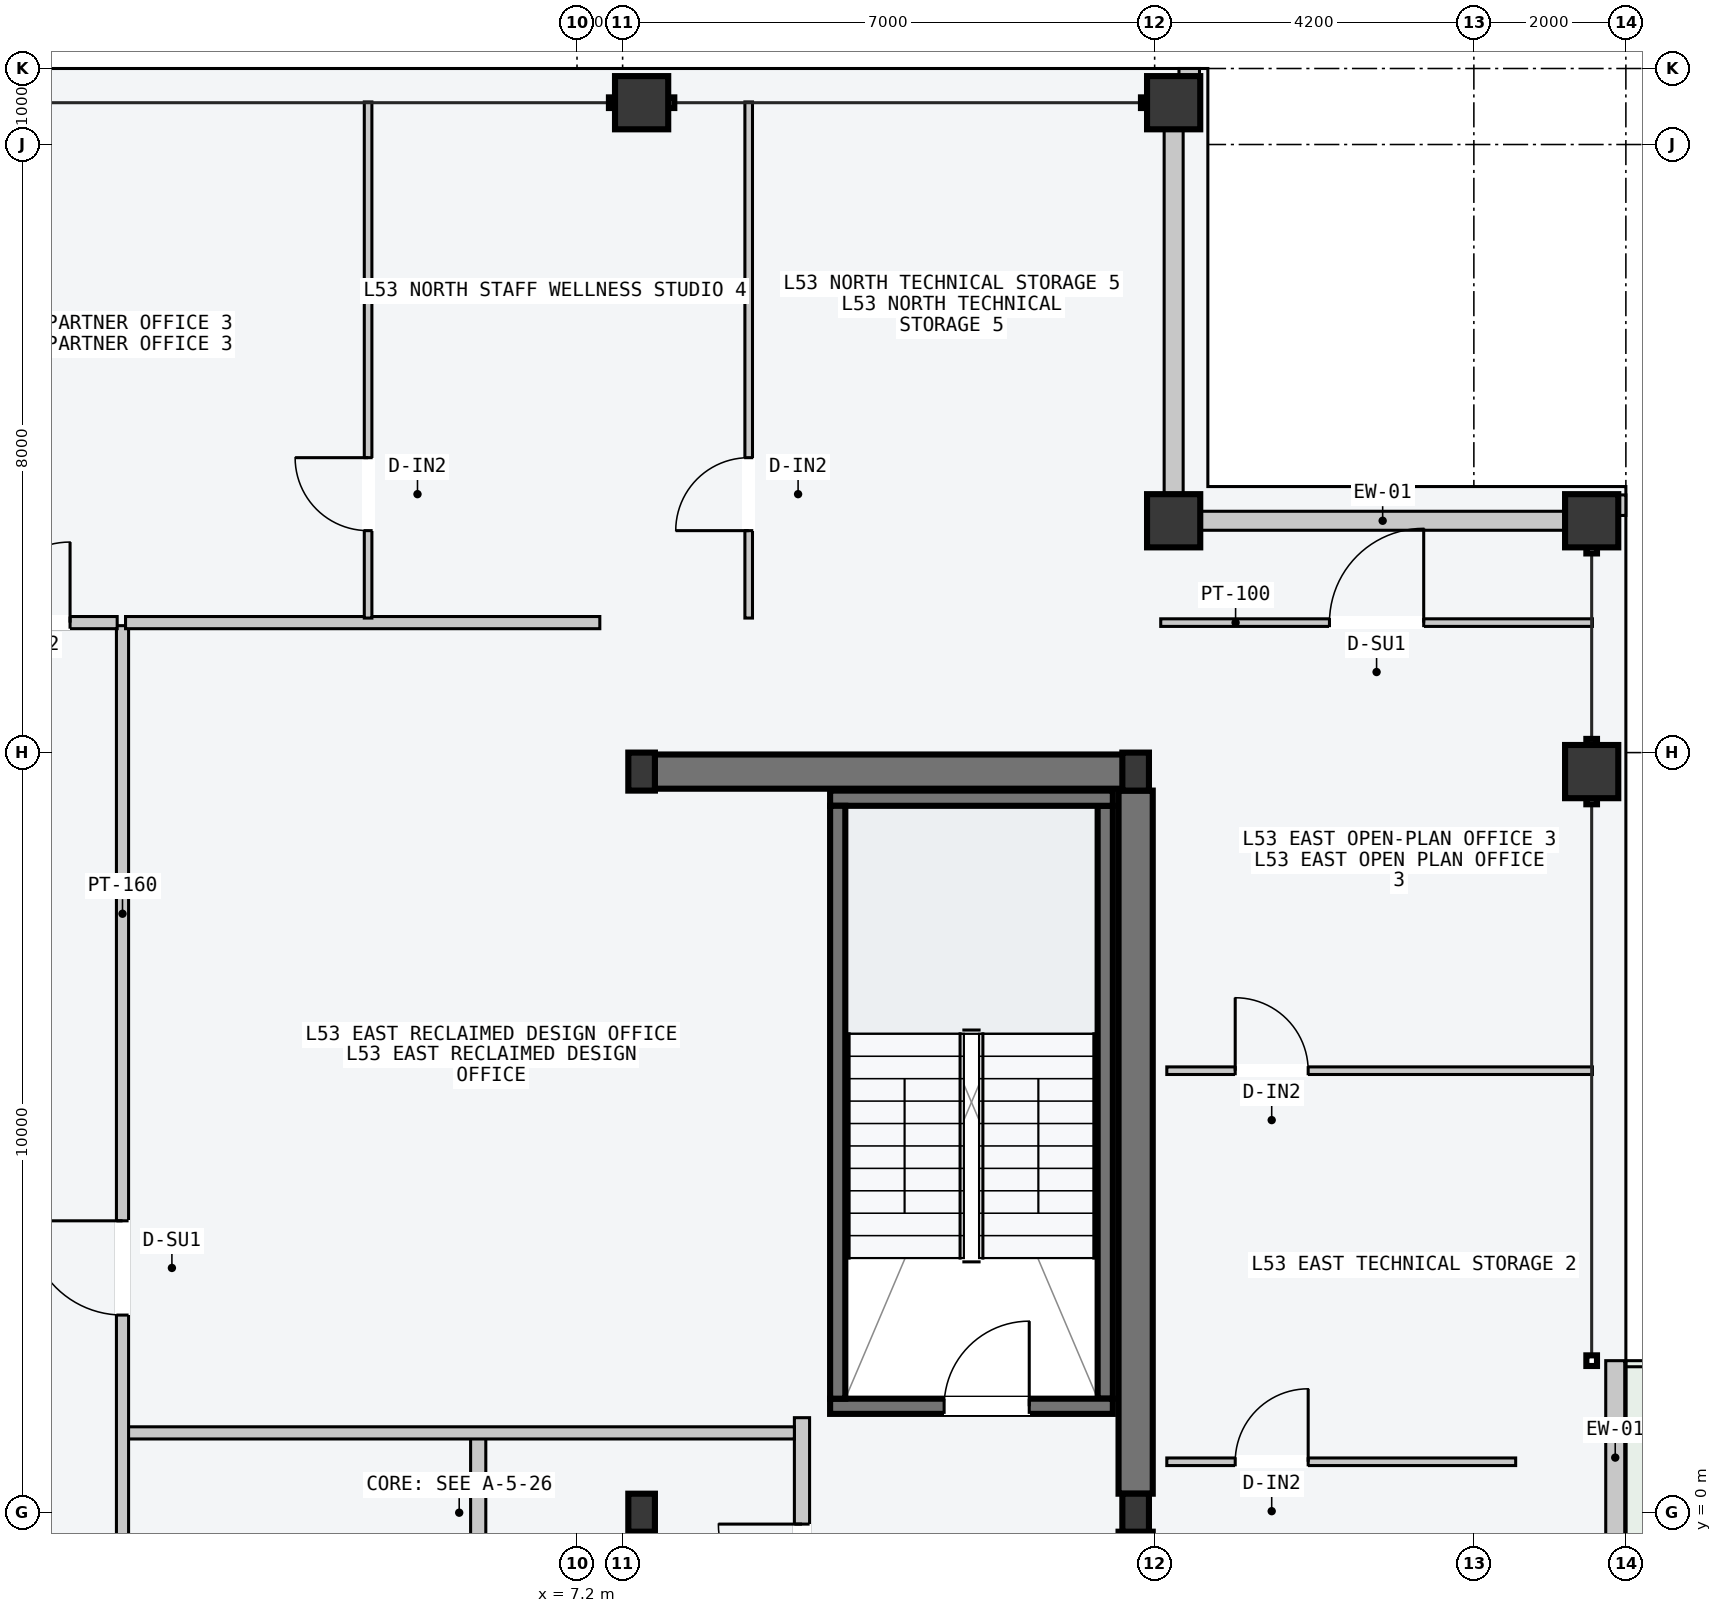
"""IFC4 building model, lengths in metres.
Left out: names, types, materials, properties, quantities, classifications, styles, units other than length and angle.
Written with IfcOpenShell. Run it as: python <this file> out.ifc"""

import sys

from ifc_helpers import new_model, si_unit, direction, frame, frame_2d, origin, origin_2d, place, context, subcontext, project, spatial, rectangle, hollow_rectangle, i_section, extrude, element, fill, save


model = new_model("IFC4")
c1 = context("Model", 3, precision=1e-05, world=origin(), true_north=direction((0.0, 1.0)))
c2 = subcontext(c1, "Body", "Model", "MODEL_VIEW")
j1 = project(units=[si_unit("LENGTHUNIT", "METRE"), si_unit("PLANEANGLEUNIT", "RADIAN")], contexts=[c1])
p1 = place(None, origin())
s1 = spatial("IfcSite", under=j1, at=p1, CompositionType="ELEMENT")
p2 = place(p1, origin())
s2 = spatial("IfcBuilding", under=s1, at=p2, CompositionType="ELEMENT")
p3 = place(p2, frame((0.0, 0.0, 201.9)))
s3 = spatial("IfcBuildingStorey", under=s2, at=p3, CompositionType="ELEMENT", Elevation=201.9)
p4 = place(p3, frame((8.07, 9.75, -0.2), z_axis=(0.0, 0.0, 1.0), x_axis=(1.0, 0.0, 0.0)))
e1 = element("IfcWall", 1, at=p4, inside=s3, PredefinedType="SHEAR", context=c2, shape_type="SweptSolid", body=[
    extrude(rectangle(XDim=6.46, YDim=0.45, at=frame_2d((3.23, 0.0))), origin(), (0.0, 0.0, 1.0), 3.6),
])
for number, where, z_axis, x_axis in (
    (2, (14.55, -9.5, -0.2), (0.0, 0.0, 1.0), (0.0, 1.0, 0.0)),
    (3, (14.55, 0.25, -0.2), (0.0, 0.0, 1.0), (0.0, 1.0, 0.0)),
):
    element("IfcWall", number, at=place(p3, frame(where, z_axis=z_axis, x_axis=x_axis)), inside=s3, PredefinedType="SHEAR", context=c2, shape_type="SweptSolid", body=[
        extrude(rectangle(XDim=9.25, YDim=0.45, at=frame_2d((4.625, 0.0))), origin(), (0.0, 0.0, 1.0), 3.6),
    ])
p5 = place(p3, frame((14.15, 1.5, -0.2), z_axis=(0.0, 0.0, 1.0), x_axis=(0.0, 1.0, 0.0)))
e4 = element("IfcWall", 4, at=p5, inside=s3, PredefinedType="SOLIDWALL", context=c2, shape_type="SweptSolid", body=[
    extrude(rectangle(XDim=7.8, YDim=0.2, at=frame_2d((3.9, 0.0))), origin(), (0.0, 0.0, 1.0), 3.6),
])
p6 = place(p3, frame((10.53, 1.4, -0.2), z_axis=(0.0, 0.0, 1.0), x_axis=(1.0, 0.0, 0.0)))
e5 = element("IfcWall", 5, at=p6, inside=s3, PredefinedType="SOLIDWALL", context=c2, shape_type="SweptSolid", body=[
    extrude(rectangle(XDim=3.72, YDim=0.2, at=frame_2d((1.86, 0.0))), origin(), (0.0, 0.0, 1.0), 3.6),
])
p7 = place(p6, frame((1.5, 0.0, 0.2)))
e6 = element("IfcOpeningElement", 6, at=p7, cuts=e5, PredefinedType="OPENING", context=c2, shape_type="SweptSolid", body=[
    extrude(rectangle(XDim=1.12, YDim=2.18, at=frame_2d((0.56, 1.09))), frame((0.0, 0.11, 0.0), z_axis=(0.0, -1.0, 0.0), x_axis=(1.0, 0.0, 0.0)), (0.0, 0.0, 1.0), 0.22),
])
p8 = place(p3, frame((10.53, 9.4, -0.2), z_axis=(0.0, 0.0, 1.0), x_axis=(1.0, 0.0, 0.0)))
e7 = element("IfcWall", 7, at=p8, inside=s3, PredefinedType="SOLIDWALL", context=c2, shape_type="SweptSolid", body=[
    extrude(rectangle(XDim=3.72, YDim=0.2, at=frame_2d((1.86, 0.0))), origin(), (0.0, 0.0, 1.0), 3.6),
])
p9 = place(p3, frame((10.63, 1.5, -0.2), z_axis=(0.0, 0.0, 1.0), x_axis=(0.0, 1.0, 0.0)))
e8 = element("IfcWall", 8, at=p9, inside=s3, PredefinedType="SOLIDWALL", context=c2, shape_type="SweptSolid", body=[
    extrude(rectangle(XDim=7.8, YDim=0.2, at=frame_2d((3.9, 0.0))), origin(), (0.0, 0.0, 1.0), 3.6),
])
for number, where, z_axis, x_axis in (
    (9, (8.05, 0.0, 0.0), (0.0, 0.0, 1.0), (1.0, 0.0, 0.0)),
    (10, (8.05, 9.75, 0.0), (0.0, 0.0, 1.0), (1.0, 0.0, 0.0)),
    (11, (14.55, 0.0, 0.0), (0.0, 0.0, 1.0), (1.0, 0.0, 0.0)),
    (12, (14.55, 9.75, 0.0), (0.0, 0.0, 1.0), (1.0, 0.0, 0.0)),
):
    element("IfcColumn", number, at=place(p3, frame(where, z_axis=z_axis, x_axis=x_axis)), inside=s3, PredefinedType="COLUMN", context=c2, shape_type="SweptSolid", body=[
        extrude(i_section(OverallWidth=0.35, OverallDepth=0.5, WebThickness=0.02, FlangeThickness=0.032, at=origin_2d()), origin(), (0.0, 0.0, 1.0), 3.6),
    ])
for number, where, z_axis, x_axis in (
    (13, (8.05, 18.55, 0.0), (0.0, 0.0, 1.0), (1.0, 0.0, 0.0)),
    (14, (15.05, 18.55, 0.0), (0.0, 0.0, 1.0), (1.0, 0.0, 0.0)),
    (15, (20.55, 9.75, 0.0), (0.0, 0.0, 1.0), (0.0, 1.0, 0.0)),
    (16, (20.55, 13.05, 0.0), (0.0, 0.0, 1.0), (0.0, 1.0, 0.0)),
    (17, (15.05, 13.05, 0.0), (0.0, 0.0, 1.0), (1.0, 0.0, 0.0)),
):
    element("IfcColumn", number, at=place(p3, frame(where, z_axis=z_axis, x_axis=x_axis)), inside=s3, PredefinedType="COLUMN", context=c2, shape_type="SweptSolid", body=[
        extrude(hollow_rectangle(XDim=0.7, YDim=0.7, WallThickness=0.03, at=origin_2d()), origin(), (0.0, 0.0, 1.0), 3.6),
    ])
p10 = place(p3, frame((20.86, -8.8, 0.0), z_axis=(0.0, 0.0, 1.0), x_axis=(0.0, 1.0, 0.0)))
e18 = element("IfcWall", 18, at=p10, inside=s3, PredefinedType="STANDARD", context=c2, shape_type="SweptSolid", body=[
    extrude(rectangle(XDim=10.8, YDim=0.25, at=frame_2d((5.4, 0.0))), origin(), (0.0, 0.0, 1.0), 3.4),
])
p11 = place(p10, frame((6.4, 0.0, 0.0)))
e19 = element("IfcOpeningElement", 19, at=p11, cuts=e18, PredefinedType="OPENING", context=c2, shape_type="SweptSolid", body=[
    extrude(rectangle(XDim=1.6, YDim=2.2, at=frame_2d((0.8, 1.1))), frame((0.0, 0.135, 0.0), z_axis=(0.0, -1.0, 0.0), x_axis=(1.0, 0.0, 0.0)), (0.0, 0.0, 1.0), 0.27),
])
p12 = place(p10, frame((2.0, 0.0, 0.85)))
e20 = element("IfcOpeningElement", 20, at=p12, cuts=e18, PredefinedType="OPENING", context=c2, shape_type="SweptSolid", body=[
    extrude(rectangle(XDim=2.0, YDim=2.1, at=frame_2d((1.0, 1.05))), frame((0.0, 0.135, 0.0), z_axis=(0.0, -1.0, 0.0), x_axis=(1.0, 0.0, 0.0)), (0.0, 0.0, 1.0), 0.27),
])
for number, where, z_axis, x_axis in (
    (21, (15.41, 13.05, 0.0), (0.0, 0.0, 1.0), (1.0, 0.0, 0.0)),
    (22, (15.05, 13.41, 0.0), (0.0, 0.0, 1.0), (0.0, 1.0, 0.0)),
):
    element("IfcWall", number, at=place(p3, frame(where, z_axis=z_axis, x_axis=x_axis)), inside=s3, PredefinedType="STANDARD", context=c2, shape_type="SweptSolid", body=[
        extrude(rectangle(XDim=4.78, YDim=0.25, at=frame_2d((2.39, 0.0))), origin(), (0.0, 0.0, 1.0), 2.75),
    ])
for number, where, z_axis, x_axis in (
    (23, (15.12, 18.89, 0.0), (0.0, 0.0, 1.0), (1.0, 0.0, 0.0)),
    (24, (20.89, 13.12, 0.0), (0.0, 0.0, 1.0), (0.0, 1.0, 0.0)),
):
    element("IfcWall", number, at=place(p3, frame(where, z_axis=z_axis, x_axis=x_axis)), inside=s3, PredefinedType="PARAPET", context=c2, shape_type="SweptSolid", body=[
        extrude(rectangle(XDim=0.27, YDim=0.22, at=frame_2d((0.135, 0.0))), origin(), (0.0, 0.0, 1.0), 1.2),
    ])
p13 = place(p3, frame((5.9, -9.45, 0.0), z_axis=(0.0, 0.0, 1.0), x_axis=(0.0, 1.0, 0.0)))
e25 = element("IfcWall", 25, at=p13, inside=s3, PredefinedType="PARTITIONING", context=c2, shape_type="SweptSolid", body=[
    extrude(rectangle(XDim=10.5, YDim=0.2, at=frame_2d((5.25, 0.0))), origin(), (0.0, 0.0, 1.0), 3.4),
])
p14 = place(p13, frame((3.9, 0.0, 0.0)))
e26 = element("IfcOpeningElement", 26, at=p14, cuts=e25, PredefinedType="OPENING", context=c2, shape_type="SweptSolid", body=[
    extrude(rectangle(XDim=1.5, YDim=2.2, at=frame_2d((0.75, 1.1))), frame((0.0, 0.11, 0.0), z_axis=(0.0, -1.0, 0.0), x_axis=(1.0, 0.0, 0.0)), (0.0, 0.0, 1.0), 0.22),
])
p15 = place(p3, frame((10.16, -2.55, 0.0), z_axis=(0.0, 0.0, 1.0), x_axis=(0.0, 1.0, 0.0)))
e27 = element("IfcWall", 27, at=p15, inside=s3, PredefinedType="PARTITIONING", context=c2, shape_type="SweptSolid", body=[
    extrude(rectangle(XDim=3.8, YDim=0.2, at=frame_2d((1.9, 0.0))), origin(), (0.0, 0.0, 1.0), 3.4),
])
p16 = place(p15, frame((1.3, 0.0, 0.0)))
e28 = element("IfcOpeningElement", 28, at=p16, cuts=e27, PredefinedType="OPENING", context=c2, shape_type="SweptSolid", body=[
    extrude(rectangle(XDim=1.1, YDim=2.15, at=frame_2d((0.55, 1.075))), frame((0.0, 0.11, 0.0), z_axis=(0.0, -1.0, 0.0), x_axis=(1.0, 0.0, 0.0)), (0.0, 0.0, 1.0), 0.22),
])
p17 = place(p3, frame((1.26, 1.05, 0.0), z_axis=(0.0, 0.0, 1.0), x_axis=(1.0, 0.0, 0.0)))
e29 = element("IfcWall", 29, at=p17, inside=s3, PredefinedType="PARTITIONING", context=c2, shape_type="SweptSolid", body=[
    extrude(rectangle(XDim=8.8, YDim=0.16, at=frame_2d((4.4, 0.0))), origin(), (0.0, 0.0, 1.0), 3.4),
])
p18 = place(p3, frame((1.22, -3.5, 0.0), z_axis=(0.0, 0.0, 1.0), x_axis=(0.0, 1.0, 0.0)))
e30 = element("IfcWall", 30, at=p18, inside=s3, PredefinedType="PARTITIONING", context=c2, shape_type="SweptSolid", body=[
    extrude(rectangle(XDim=15.17, YDim=0.16, at=frame_2d((7.585, 0.0))), origin(), (0.0, 0.0, 1.0), 3.4),
])
p19 = place(p18, frame((6.1, 0.0, 0.0)))
e31 = element("IfcOpeningElement", 31, at=p19, cuts=e30, PredefinedType="OPENING", context=c2, shape_type="SweptSolid", body=[
    extrude(rectangle(XDim=1.24, YDim=2.24, at=frame_2d((0.62, 1.12))), frame((0.0, 0.09, 0.0), z_axis=(0.0, -1.0, 0.0), x_axis=(1.0, 0.0, 0.0)), (0.0, 0.0, 1.0), 0.18),
])
p20 = place(p18, frame((1.6, 0.0, 0.0)))
e32 = element("IfcOpeningElement", 32, at=p20, cuts=e30, PredefinedType="OPENING", context=c2, shape_type="SweptSolid", body=[
    extrude(rectangle(XDim=0.96, YDim=2.18, at=frame_2d((0.48, 1.09))), frame((0.0, 0.09, 0.0), z_axis=(0.0, -1.0, 0.0), x_axis=(1.0, 0.0, 0.0)), (0.0, 0.0, 1.0), 0.18),
])
p21 = place(p3, frame((1.26, 11.71, 0.0), z_axis=(0.0, 0.0, 1.0), x_axis=(1.0, 0.0, 0.0)))
e33 = element("IfcWall", 33, at=p21, inside=s3, PredefinedType="PARTITIONING", context=c2, shape_type="SweptSolid", body=[
    extrude(rectangle(XDim=6.24, YDim=0.16, at=frame_2d((3.12, 0.0))), origin(), (0.0, 0.0, 1.0), 3.4),
])
p22 = place(p3, frame((4.451, 11.77, 0.0), z_axis=(0.0, 0.0, 1.0), x_axis=(0.0, 1.0, 0.0)))
e34 = element("IfcWall", 34, at=p22, inside=s3, PredefinedType="PARTITIONING", context=c2, shape_type="SweptSolid", body=[
    extrude(rectangle(XDim=6.79, YDim=0.1, at=frame_2d((3.395, 0.0))), origin(), (0.0, 0.0, 1.0), 3.4),
])
p23 = place(p22, frame((1.15, 0.0, 0.0)))
e35 = element("IfcOpeningElement", 35, at=p23, cuts=e34, PredefinedType="OPENING", context=c2, shape_type="SweptSolid", body=[
    extrude(rectangle(XDim=0.96, YDim=2.18, at=frame_2d((0.48, 1.09))), frame((0.0, 0.06, 0.0), z_axis=(0.0, -1.0, 0.0), x_axis=(1.0, 0.0, 0.0)), (0.0, 0.0, 1.0), 0.12),
])
p24 = place(p3, frame((9.459, 11.77, 0.0), z_axis=(0.0, 0.0, 1.0), x_axis=(0.0, 1.0, 0.0)))
e36 = element("IfcWall", 36, at=p24, inside=s3, PredefinedType="PARTITIONING", context=c2, shape_type="SweptSolid", body=[
    extrude(rectangle(XDim=6.79, YDim=0.1, at=frame_2d((3.395, 0.0))), origin(), (0.0, 0.0, 1.0), 3.4),
])
p25 = place(p24, frame((1.15, 0.0, 0.0)))
e37 = element("IfcOpeningElement", 37, at=p25, cuts=e36, PredefinedType="OPENING", context=c2, shape_type="SweptSolid", body=[
    extrude(rectangle(XDim=0.96, YDim=2.18, at=frame_2d((0.48, 1.09))), frame((0.0, 0.06, 0.0), z_axis=(0.0, -1.0, 0.0), x_axis=(1.0, 0.0, 0.0)), (0.0, 0.0, 1.0), 0.12),
])
p26 = place(p3, frame((-1.15, 11.71, 0.0), z_axis=(0.0, 0.0, 1.0), x_axis=(1.0, 0.0, 0.0)))
e38 = element("IfcWall", 38, at=p26, inside=s3, PredefinedType="PARTITIONING", context=c2, shape_type="SweptSolid", body=[
    extrude(rectangle(XDim=2.3, YDim=0.16, at=frame_2d((1.15, 0.0))), origin(), (0.0, 0.0, 1.0), 3.4),
])
p27 = place(p26, frame((0.62, 0.0, 0.0)))
e39 = element("IfcOpeningElement", 39, at=p27, cuts=e38, PredefinedType="OPENING", context=c2, shape_type="SweptSolid", body=[
    extrude(rectangle(XDim=1.06, YDim=2.2, at=frame_2d((0.53, 1.1))), frame((0.0, 0.09, 0.0), z_axis=(0.0, -1.0, 0.0), x_axis=(1.0, 0.0, 0.0)), (0.0, 0.0, 1.0), 0.18),
])
p28 = place(p3, frame((14.88, 11.71, 0.0), z_axis=(0.0, 0.0, 1.0), x_axis=(1.0, 0.0, 0.0)))
e40 = element("IfcWall", 40, at=p28, inside=s3, PredefinedType="PARTITIONING", context=c2, shape_type="SweptSolid", body=[
    extrude(rectangle(XDim=5.68, YDim=0.1, at=frame_2d((2.84, 0.0))), origin(), (0.0, 0.0, 1.0), 3.4),
])
p29 = place(p28, frame((2.22, 0.0, 0.0)))
e41 = element("IfcOpeningElement", 41, at=p29, cuts=e40, PredefinedType="OPENING", context=c2, shape_type="SweptSolid", body=[
    extrude(rectangle(XDim=1.24, YDim=2.24, at=frame_2d((0.62, 1.12))), frame((0.0, 0.06, 0.0), z_axis=(0.0, -1.0, 0.0), x_axis=(1.0, 0.0, 0.0)), (0.0, 0.0, 1.0), 0.12),
])
p30 = place(p3, frame((14.96, 0.67, 0.0), z_axis=(0.0, 0.0, 1.0), x_axis=(1.0, 0.0, 0.0)))
e42 = element("IfcWall", 42, at=p30, inside=s3, PredefinedType="PARTITIONING", context=c2, shape_type="SweptSolid", body=[
    extrude(rectangle(XDim=4.59, YDim=0.1, at=frame_2d((2.295, 0.0))), origin(), (0.0, 0.0, 1.0), 3.4),
])
p31 = place(p30, frame((0.9, 0.0, 0.0)))
e43 = element("IfcOpeningElement", 43, at=p31, cuts=e42, PredefinedType="OPENING", context=c2, shape_type="SweptSolid", body=[
    extrude(rectangle(XDim=0.96, YDim=2.18, at=frame_2d((0.48, 1.09))), frame((0.0, 0.06, 0.0), z_axis=(0.0, -1.0, 0.0), x_axis=(1.0, 0.0, 0.0)), (0.0, 0.0, 1.0), 0.12),
])
p32 = place(p3, frame((14.96, 5.815, 0.0), z_axis=(0.0, 0.0, 1.0), x_axis=(1.0, 0.0, 0.0)))
e44 = element("IfcWall", 44, at=p32, inside=s3, PredefinedType="PARTITIONING", context=c2, shape_type="SweptSolid", body=[
    extrude(rectangle(XDim=5.6, YDim=0.1, at=frame_2d((2.8, 0.0))), origin(), (0.0, 0.0, 1.0), 3.4),
])
p33 = place(p32, frame((0.9, 0.0, 0.0)))
e45 = element("IfcOpeningElement", 45, at=p33, cuts=e44, PredefinedType="OPENING", context=c2, shape_type="SweptSolid", body=[
    extrude(rectangle(XDim=0.96, YDim=2.18, at=frame_2d((0.48, 1.09))), frame((0.0, 0.06, 0.0), z_axis=(0.0, -1.0, 0.0), x_axis=(1.0, 0.0, 0.0)), (0.0, 0.0, 1.0), 0.12),
])
p34 = place(p7, origin())
e46 = element("IfcDoor", 46, at=p34, inside=s3, OperationType="SINGLE_SWING_RIGHT", PredefinedType="DOOR", context=c2, shape_type="SweptSolid", body=[
    extrude(rectangle(XDim=1.12, YDim=2.18, at=frame_2d((0.56, 1.09))), frame((0.0, 0.025, 0.0), z_axis=(0.0, -1.0, 0.0), x_axis=(1.0, 0.0, 0.0)), (0.0, 0.0, 1.0), 0.05),
])
fill(e6, e46)
p35 = place(p16, origin())
e47 = element("IfcDoor", 47, at=p35, inside=s3, OperationType="SINGLE_SWING_RIGHT", PredefinedType="DOOR", context=c2, shape_type="SweptSolid", body=[
    extrude(rectangle(XDim=1.1, YDim=2.15, at=frame_2d((0.55, 1.075))), frame((0.0, 0.025, 0.0), z_axis=(0.0, -1.0, 0.0), x_axis=(1.0, 0.0, 0.0)), (0.0, 0.0, 1.0), 0.05),
])
fill(e28, e47)
p36 = place(p19, origin())
e48 = element("IfcDoor", 48, at=p36, inside=s3, OperationType="SINGLE_SWING_RIGHT", PredefinedType="DOOR", context=c2, shape_type="SweptSolid", body=[
    extrude(rectangle(XDim=1.24, YDim=2.24, at=frame_2d((0.62, 1.12))), frame((0.0, 0.025, 0.0), z_axis=(0.0, -1.0, 0.0), x_axis=(1.0, 0.0, 0.0)), (0.0, 0.0, 1.0), 0.05),
])
fill(e31, e48)
p37 = place(p23, origin())
e49 = element("IfcDoor", 49, at=p37, inside=s3, OperationType="SINGLE_SWING_RIGHT", PredefinedType="DOOR", context=c2, shape_type="SweptSolid", body=[
    extrude(rectangle(XDim=0.96, YDim=2.18, at=frame_2d((0.48, 1.09))), frame((0.0, 0.025, 0.0), z_axis=(0.0, -1.0, 0.0), x_axis=(1.0, 0.0, 0.0)), (0.0, 0.0, 1.0), 0.05),
])
fill(e35, e49)
p38 = place(p25, origin())
e50 = element("IfcDoor", 50, at=p38, inside=s3, OperationType="SINGLE_SWING_LEFT", PredefinedType="DOOR", context=c2, shape_type="SweptSolid", body=[
    extrude(rectangle(XDim=0.96, YDim=2.18, at=frame_2d((0.48, 1.09))), frame((0.0, 0.025, 0.0), z_axis=(0.0, -1.0, 0.0), x_axis=(1.0, 0.0, 0.0)), (0.0, 0.0, 1.0), 0.05),
])
fill(e37, e50)
p39 = place(p27, origin())
e51 = element("IfcDoor", 51, at=p39, inside=s3, OperationType="SINGLE_SWING_RIGHT", PredefinedType="DOOR", context=c2, shape_type="SweptSolid", body=[
    extrude(rectangle(XDim=1.06, YDim=2.2, at=frame_2d((0.53, 1.1))), frame((0.0, 0.025, 0.0), z_axis=(0.0, -1.0, 0.0), x_axis=(1.0, 0.0, 0.0)), (0.0, 0.0, 1.0), 0.05),
])
fill(e39, e51)
p40 = place(p29, origin())
e52 = element("IfcDoor", 52, at=p40, inside=s3, OperationType="SINGLE_SWING_RIGHT", PredefinedType="DOOR", context=c2, shape_type="SweptSolid", body=[
    extrude(rectangle(XDim=1.24, YDim=2.24, at=frame_2d((0.62, 1.12))), frame((0.0, 0.025, 0.0), z_axis=(0.0, -1.0, 0.0), x_axis=(1.0, 0.0, 0.0)), (0.0, 0.0, 1.0), 0.05),
])
fill(e41, e52)
p41 = place(p31, origin())
e53 = element("IfcDoor", 53, at=p41, inside=s3, OperationType="SINGLE_SWING_RIGHT", PredefinedType="DOOR", context=c2, shape_type="SweptSolid", body=[
    extrude(rectangle(XDim=0.96, YDim=2.18, at=frame_2d((0.48, 1.09))), frame((0.0, 0.025, 0.0), z_axis=(0.0, -1.0, 0.0), x_axis=(1.0, 0.0, 0.0)), (0.0, 0.0, 1.0), 0.05),
])
fill(e43, e53)
p42 = place(p33, origin())
e54 = element("IfcDoor", 54, at=p42, inside=s3, OperationType="SINGLE_SWING_LEFT", PredefinedType="DOOR", context=c2, shape_type="SweptSolid", body=[
    extrude(rectangle(XDim=0.96, YDim=2.18, at=frame_2d((0.48, 1.09))), frame((0.0, 0.025, 0.0), z_axis=(0.0, -1.0, 0.0), x_axis=(1.0, 0.0, 0.0)), (0.0, 0.0, 1.0), 0.05),
])
fill(e45, e54)
save(model, sys.argv[1])
